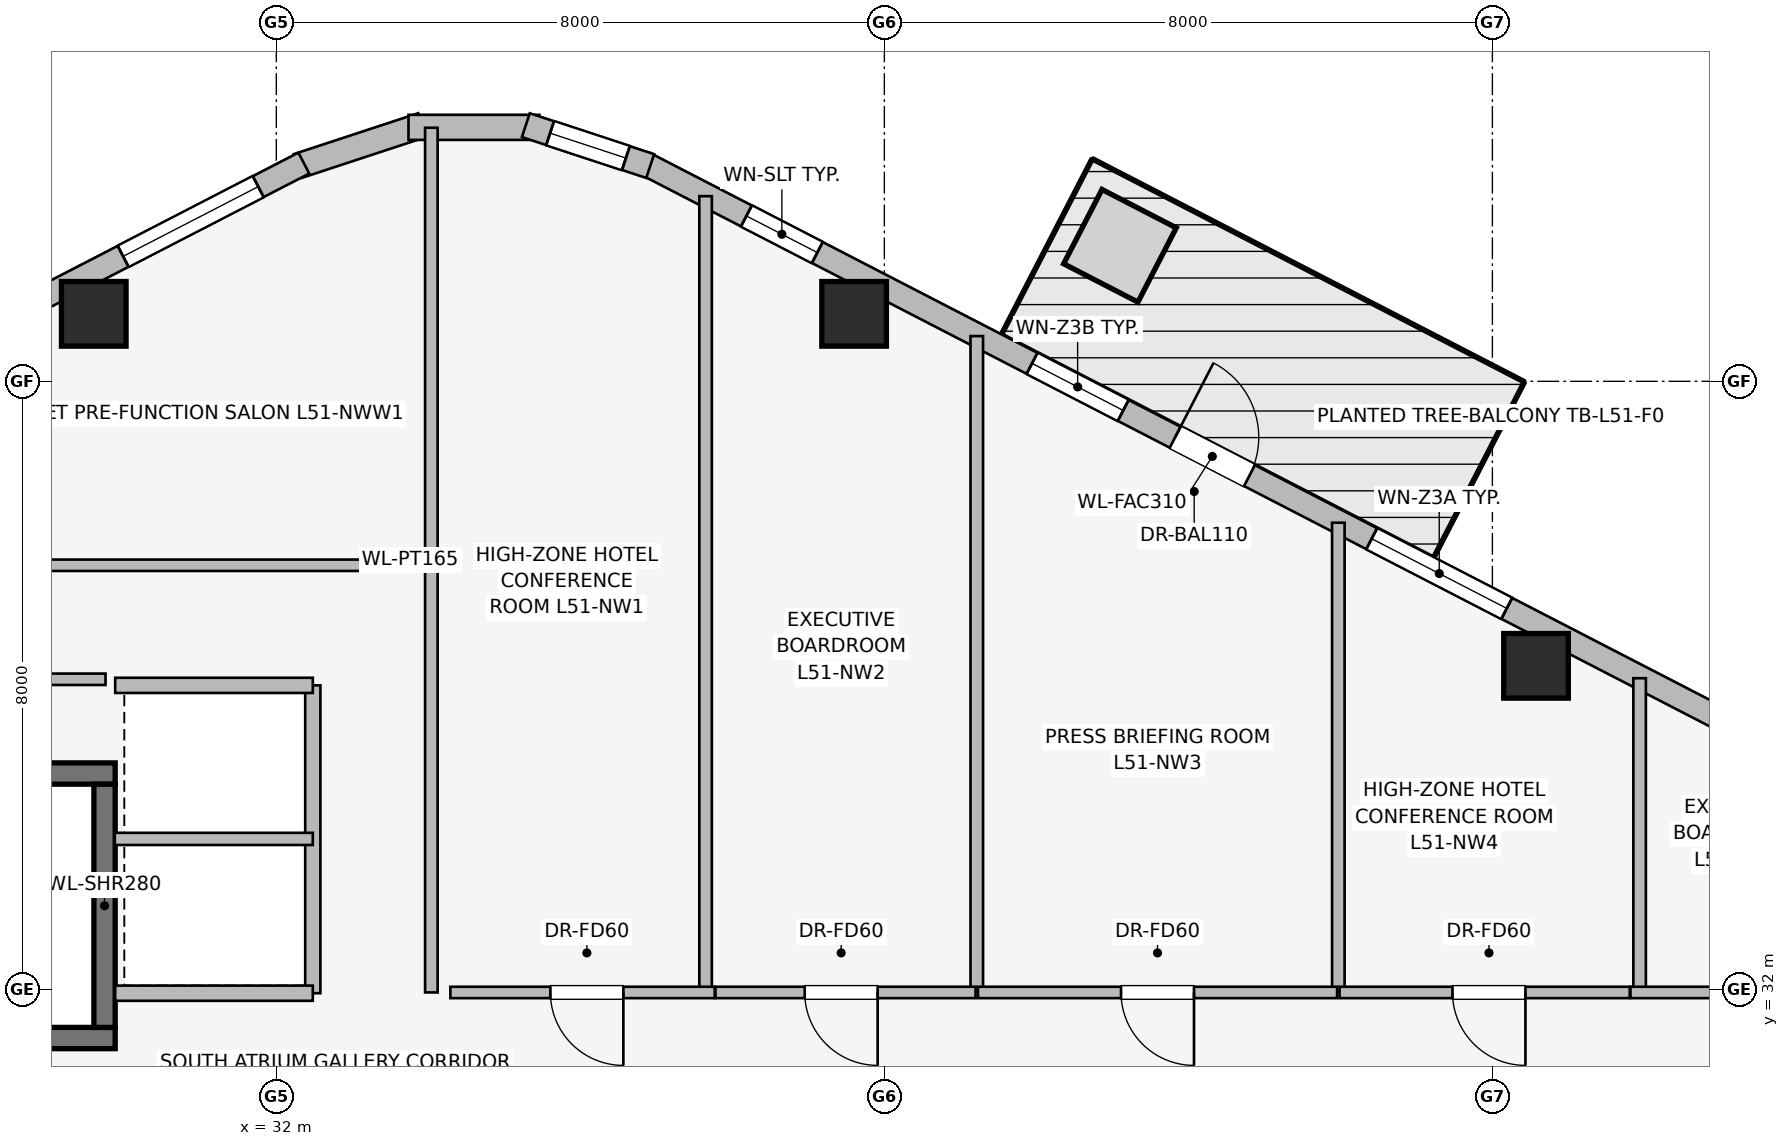
"""IFC4 building model, lengths in metres.
Left out: names, types, materials, properties, quantities, classifications, styles, units other than length and angle.
Written with IfcOpenShell. Run it as: python <this file> out.ifc"""

import sys

from ifc_helpers import new_model, si_unit, direction, frame, frame_2d, origin, origin_2d, place, context, subcontext, project, spatial, rectangle, extrude, element, fill, save


model = new_model("IFC4")
c1 = context("Model", 3, precision=1e-05, world=origin(), true_north=direction((0.0, 1.0)))
c2 = subcontext(c1, "Body", "Model", "MODEL_VIEW")
j1 = project(units=[si_unit("LENGTHUNIT", "METRE"), si_unit("PLANEANGLEUNIT", "RADIAN")], contexts=[c1])
p1 = place(None, origin())
s1 = spatial("IfcSite", under=j1, at=p1, CompositionType="ELEMENT")
p2 = place(p1, origin())
s2 = spatial("IfcBuilding", under=s1, at=p2, CompositionType="ELEMENT")
p3 = place(p2, frame((0.0, 0.0, 187.8)))
s3 = spatial("IfcBuildingStorey", under=s2, at=p3, CompositionType="ELEMENT", Elevation=187.8)
p4 = place(p3, frame((21.52, 31.36, 0.0), z_axis=(0.0, 0.0, 1.0), x_axis=(1.0, 0.0, 0.0)))
e1 = element("IfcWall", 1, at=p4, inside=s3, PredefinedType="SHEAR", context=c2, shape_type="SweptSolid", body=[
    extrude(rectangle(XDim=8.36, YDim=0.28, at=frame_2d((4.18, 0.0))), origin(), (0.0, 0.0, 1.0), 3.45),
])
p5 = place(p4, frame((0.45, 0.0, 0.0)))
e2 = element("IfcOpeningElement", 2, at=p5, cuts=e1, PredefinedType="OPENING", context=c2, shape_type="SweptSolid", body=[
    extrude(rectangle(XDim=1.05, YDim=2.0, at=frame_2d((0.525, 1.0))), frame((0.0, 0.15, 0.0), z_axis=(0.0, -1.0, 0.0), x_axis=(1.0, 0.0, 0.0)), (0.0, 0.0, 1.0), 0.3),
])
p6 = place(p3, frame((29.88, 34.84, 0.0), z_axis=(0.0, 0.0, 1.0), x_axis=(-1.0, 0.0, 0.0)))
e3 = element("IfcWall", 3, at=p6, inside=s3, PredefinedType="SHEAR", context=c2, shape_type="SweptSolid", body=[
    extrude(rectangle(XDim=8.36, YDim=0.28, at=frame_2d((4.18, 0.0))), origin(), (0.0, 0.0, 1.0), 3.45),
])
p7 = place(p3, frame((29.74, 31.5, 0.0), z_axis=(0.0, 0.0, 1.0), x_axis=(0.0, 1.0, 0.0)))
e4 = element("IfcWall", 4, at=p7, inside=s3, PredefinedType="SHEAR", context=c2, shape_type="SweptSolid", body=[
    extrude(rectangle(XDim=3.2, YDim=0.28, at=frame_2d((1.6, 0.0))), origin(), (0.0, 0.0, 1.0), 3.45),
])
for number, where, z_axis, x_axis in (
    (5, (48.574, 36.257, 0.0), (0.0, 0.0, 1.0), (1.0, 0.0, 0.0)),
    (6, (39.602, 40.888, 0.0), (0.0, 0.0, 1.0), (1.0, 0.0, 0.0)),
    (7, (29.598, 40.888, 0.0), (0.0, 0.0, 1.0), (1.0, 0.0, 0.0)),
):
    element("IfcColumn", number, at=place(p3, frame(where, z_axis=z_axis, x_axis=x_axis)), inside=s3, PredefinedType="COLUMN", context=c2, shape_type="SweptSolid", body=[
        extrude(rectangle(XDim=0.85, YDim=0.85, at=origin_2d()), origin(), (0.0, 0.0, 1.0), 3.45),
    ])
p8 = place(p3, frame((36.838, 42.871, 0.0), z_axis=(0.0, 0.0, 1.0), x_axis=(0.888626188278, -0.458632202867, 0.0)))
e8 = element("IfcWall", 8, at=p8, inside=s3, PredefinedType="STANDARD", context=c2, shape_type="SweptSolid", body=[
    extrude(rectangle(XDim=16.828, YDim=0.31, at=frame_2d((8.414, 0.0))), origin(), (0.0, 0.0, 1.0), 3.14),
])
p9 = place(p8, frame((7.864, 0.0, 0.0)))
e9 = element("IfcOpeningElement", 9, at=p9, cuts=e8, PredefinedType="OPENING", context=c2, shape_type="SweptSolid", body=[
    extrude(rectangle(XDim=1.1, YDim=2.04, at=frame_2d((0.55, 1.02))), frame((0.0, 0.165, 0.0), z_axis=(0.0, -1.0, 0.0), x_axis=(1.0, 0.0, 0.0)), (0.0, 0.0, 1.0), 0.33),
])
p10 = place(p8, frame((1.516, 0.0, 0.75)))
e10 = element("IfcOpeningElement", 10, at=p10, cuts=e8, PredefinedType="OPENING", context=c2, shape_type="SweptSolid", body=[
    extrude(rectangle(XDim=1.05, YDim=1.4, at=frame_2d((0.525, 0.7))), frame((0.0, 0.165, 0.0), z_axis=(0.0, -1.0, 0.0), x_axis=(1.0, 0.0, 0.0)), (0.0, 0.0, 1.0), 0.33),
])
p11 = place(p8, frame((5.745, 0.0, 0.75)))
e11 = element("IfcOpeningElement", 11, at=p11, cuts=e8, PredefinedType="OPENING", context=c2, shape_type="SweptSolid", body=[
    extrude(rectangle(XDim=1.35, YDim=1.45, at=frame_2d((0.675, 0.725))), frame((0.0, 0.165, 0.0), z_axis=(0.0, -1.0, 0.0), x_axis=(1.0, 0.0, 0.0)), (0.0, 0.0, 1.0), 0.33),
])
p12 = place(p8, frame((10.774, 0.0, 0.75)))
e12 = element("IfcOpeningElement", 12, at=p12, cuts=e8, PredefinedType="OPENING", context=c2, shape_type="SweptSolid", body=[
    extrude(rectangle(XDim=2.0, YDim=1.5, at=frame_2d((1.0, 0.75))), frame((0.0, 0.165, 0.0), z_axis=(0.0, -1.0, 0.0), x_axis=(1.0, 0.0, 0.0)), (0.0, 0.0, 1.0), 0.33),
])
p13 = place(p3, frame((32.281, 42.832, 0.0), z_axis=(0.0, 0.0, 1.0), x_axis=(0.949937416267, 0.312440242569, 0.0)))
e13 = element("IfcWall", 13, at=p13, inside=s3, PredefinedType="STANDARD", context=c2, shape_type="SweptSolid", body=[
    extrude(rectangle(XDim=1.722, YDim=0.33, at=frame_2d((0.861, 0.0))), origin(), (0.0, 0.0, 1.0), 3.14),
])
p14 = place(p3, frame((33.739, 43.341, 0.0), z_axis=(0.0, 0.0, 1.0), x_axis=(1.0, 0.0, 0.0)))
e14 = element("IfcWall", 14, at=p14, inside=s3, PredefinedType="STANDARD", context=c2, shape_type="SweptSolid", body=[
    extrude(rectangle(XDim=1.722, YDim=0.33, at=frame_2d((0.861, 0.0))), origin(), (0.0, 0.0, 1.0), 3.14),
])
p15 = place(p3, frame((35.283, 43.37, 0.0), z_axis=(0.0, 0.0, 1.0), x_axis=(0.949937416267, -0.312440242569, 0.0)))
e15 = element("IfcWall", 15, at=p15, inside=s3, PredefinedType="STANDARD", context=c2, shape_type="SweptSolid", body=[
    extrude(rectangle(XDim=1.722, YDim=0.33, at=frame_2d((0.861, 0.0))), origin(), (0.0, 0.0, 1.0), 3.14),
])
p16 = place(p15, frame((0.336, 0.0, 0.75)))
e16 = element("IfcOpeningElement", 16, at=p16, cuts=e15, PredefinedType="OPENING", context=c2, shape_type="SweptSolid", body=[
    extrude(rectangle(XDim=1.05, YDim=1.4, at=frame_2d((0.525, 0.7))), frame((0.0, 0.175, 0.0), z_axis=(0.0, -1.0, 0.0), x_axis=(1.0, 0.0, 0.0)), (0.0, 0.0, 1.0), 0.35),
])
p17 = place(p3, frame((17.408, 35.153, 0.0), z_axis=(0.0, 0.0, 1.0), x_axis=(0.888626188278, 0.458632202867, 0.0)))
e17 = element("IfcWall", 17, at=p17, inside=s3, PredefinedType="STANDARD", context=c2, shape_type="SweptSolid", body=[
    extrude(rectangle(XDim=16.828, YDim=0.31, at=frame_2d((8.414, 0.0))), origin(), (0.0, 0.0, 1.0), 3.14),
])
p18 = place(p17, frame((0.675, 0.0, 0.75)))
e18 = element("IfcOpeningElement", 18, at=p18, cuts=e17, PredefinedType="OPENING", context=c2, shape_type="SweptSolid", body=[
    extrude(rectangle(XDim=2.0, YDim=1.5, at=frame_2d((1.0, 0.75))), frame((0.0, 0.165, 0.0), z_axis=(0.0, -1.0, 0.0), x_axis=(1.0, 0.0, 0.0)), (0.0, 0.0, 1.0), 0.33),
])
p19 = place(p17, frame((6.312, 0.0, 0.75)))
e19 = element("IfcOpeningElement", 19, at=p19, cuts=e17, PredefinedType="OPENING", context=c2, shape_type="SweptSolid", body=[
    extrude(rectangle(XDim=1.35, YDim=1.45, at=frame_2d((0.675, 0.725))), frame((0.0, 0.165, 0.0), z_axis=(0.0, -1.0, 0.0), x_axis=(1.0, 0.0, 0.0)), (0.0, 0.0, 1.0), 0.33),
])
p20 = place(p17, frame((8.676, 0.0, 0.75)))
e20 = element("IfcOpeningElement", 20, at=p20, cuts=e17, PredefinedType="OPENING", context=c2, shape_type="SweptSolid", body=[
    extrude(rectangle(XDim=1.35, YDim=1.45, at=frame_2d((0.675, 0.725))), frame((0.0, 0.165, 0.0), z_axis=(0.0, -1.0, 0.0), x_axis=(1.0, 0.0, 0.0)), (0.0, 0.0, 1.0), 0.33),
])
p21 = place(p17, frame((11.041, 0.0, 0.75)))
e21 = element("IfcOpeningElement", 21, at=p21, cuts=e17, PredefinedType="OPENING", context=c2, shape_type="SweptSolid", body=[
    extrude(rectangle(XDim=1.35, YDim=1.45, at=frame_2d((0.675, 0.725))), frame((0.0, 0.165, 0.0), z_axis=(0.0, -1.0, 0.0), x_axis=(1.0, 0.0, 0.0)), (0.0, 0.0, 1.0), 0.33),
])
p22 = place(p17, frame((14.153, 0.0, 0.75)))
e22 = element("IfcOpeningElement", 22, at=p22, cuts=e17, PredefinedType="OPENING", context=c2, shape_type="SweptSolid", body=[
    extrude(rectangle(XDim=2.0, YDim=1.5, at=frame_2d((1.0, 0.75))), frame((0.0, 0.165, 0.0), z_axis=(0.0, -1.0, 0.0), x_axis=(1.0, 0.0, 0.0)), (0.0, 0.0, 1.0), 0.33),
])
p23 = place(p3, frame((32.48, 31.95, 0.0), z_axis=(0.0, 0.0, 1.0), x_axis=(0.0, 1.0, 0.0)))
e23 = element("IfcWall", 23, at=p23, inside=s3, PredefinedType="PARTITIONING", context=c2, shape_type="SweptSolid", body=[
    extrude(rectangle(XDim=4.05, YDim=0.2, at=frame_2d((2.025, 0.0))), origin(), (0.0, 0.0, 1.0), 3.14),
])
for number, where, z_axis, x_axis in (
    (24, (29.88, 36.0, 0.0), (0.0, 0.0, 1.0), (1.0, 0.0, 0.0)),
    (25, (32.48, 31.95, 0.0), (0.0, 0.0, 1.0), (-1.0, 0.0, 0.0)),
):
    element("IfcWall", number, at=place(p3, frame(where, z_axis=z_axis, x_axis=x_axis)), inside=s3, PredefinedType="PARTITIONING", context=c2, shape_type="SweptSolid", body=[
        extrude(rectangle(XDim=2.6, YDim=0.2, at=frame_2d((1.3, 0.0))), origin(), (0.0, 0.0, 1.0), 3.14),
    ])
p24 = place(p3, frame((29.875, 33.98, 0.0), z_axis=(0.0, 0.0, 1.0), x_axis=(1.0, 0.0, 0.0)))
e26 = element("IfcWall", 26, at=p24, inside=s3, PredefinedType="PARTITIONING", context=c2, shape_type="SweptSolid", body=[
    extrude(rectangle(XDim=2.605, YDim=0.16, at=frame_2d((1.302, 0.0))), origin(), (0.0, 0.0, 1.0), 2.532),
])
p25 = place(p3, frame((34.0, 37.58, 0.0), z_axis=(0.0, 0.0, 1.0), x_axis=(-1.0, 0.0, 0.0)))
e27 = element("IfcWall", 27, at=p25, inside=s3, PredefinedType="PARTITIONING", context=c2, shape_type="SweptSolid", body=[
    extrude(rectangle(XDim=12.075, YDim=0.15, at=frame_2d((6.038, 0.0))), origin(), (0.0, 0.0, 1.0), 2.532),
])
p26 = place(p25, frame((5.195, 0.0, 0.0)))
e28 = element("IfcOpeningElement", 28, at=p26, cuts=e27, PredefinedType="OPENING", context=c2, shape_type="SweptSolid", body=[
    extrude(rectangle(XDim=0.96, YDim=2.0, at=frame_2d((0.48, 1.0))), frame((0.0, 0.085, 0.0), z_axis=(0.0, -1.0, 0.0), x_axis=(1.0, 0.0, 0.0)), (0.0, 0.0, 1.0), 0.17),
])
p27 = place(p3, frame((34.04, 31.96, 0.0), z_axis=(0.0, 0.0, 1.0), x_axis=(0.0, 1.0, 0.0)))
e29 = element("IfcWall", 29, at=p27, inside=s3, PredefinedType="PARTITIONING", context=c2, shape_type="SweptSolid", body=[
    extrude(rectangle(XDim=11.376, YDim=0.165, at=frame_2d((5.688, 0.0))), origin(), (0.0, 0.0, 1.0), 3.14),
])
p28 = place(p3, frame((37.648, 31.97, 0.0), z_axis=(0.0, 0.0, 1.0), x_axis=(0.0, 1.0, 0.0)))
e30 = element("IfcWall", 30, at=p28, inside=s3, PredefinedType="PARTITIONING", context=c2, shape_type="SweptSolid", body=[
    extrude(rectangle(XDim=10.466, YDim=0.165, at=frame_2d((5.233, 0.0))), origin(), (0.0, 0.0, 1.0), 3.14),
])
p29 = place(p3, frame((41.216, 31.97, 0.0), z_axis=(0.0, 0.0, 1.0), x_axis=(0.0, 1.0, 0.0)))
e31 = element("IfcWall", 31, at=p29, inside=s3, PredefinedType="PARTITIONING", context=c2, shape_type="SweptSolid", body=[
    extrude(rectangle(XDim=8.625, YDim=0.165, at=frame_2d((4.312, 0.0))), origin(), (0.0, 0.0, 1.0), 3.14),
])
p30 = place(p3, frame((45.973, 31.97, 0.0), z_axis=(0.0, 0.0, 1.0), x_axis=(0.0, 1.0, 0.0)))
e32 = element("IfcWall", 32, at=p30, inside=s3, PredefinedType="PARTITIONING", context=c2, shape_type="SweptSolid", body=[
    extrude(rectangle(XDim=6.17, YDim=0.165, at=frame_2d((3.085, 0.0))), origin(), (0.0, 0.0, 1.0), 3.14),
])
p31 = place(p3, frame((49.937, 31.97, 0.0), z_axis=(0.0, 0.0, 1.0), x_axis=(0.0, 1.0, 0.0)))
e33 = element("IfcWall", 33, at=p31, inside=s3, PredefinedType="PARTITIONING", context=c2, shape_type="SweptSolid", body=[
    extrude(rectangle(XDim=4.124, YDim=0.165, at=frame_2d((2.062, 0.0))), origin(), (0.0, 0.0, 1.0), 3.14),
])
p32 = place(p3, frame((37.768, 31.96, 0.0), z_axis=(0.0, 0.0, 1.0), x_axis=(-1.0, 0.0, 0.0)))
e34 = element("IfcWall", 34, at=p32, inside=s3, PredefinedType="PARTITIONING", context=c2, shape_type="SweptSolid", body=[
    extrude(rectangle(XDim=3.478, YDim=0.15, at=frame_2d((1.739, 0.0))), origin(), (0.0, 0.0, 1.0), 3.14),
])
p33 = place(p32, frame((1.202, 0.0, 0.0)))
e35 = element("IfcOpeningElement", 35, at=p33, cuts=e34, PredefinedType="OPENING", context=c2, shape_type="SweptSolid", body=[
    extrude(rectangle(XDim=0.96, YDim=2.0, at=frame_2d((0.48, 1.0))), frame((0.0, 0.085, 0.0), z_axis=(0.0, -1.0, 0.0), x_axis=(1.0, 0.0, 0.0)), (0.0, 0.0, 1.0), 0.17),
])
p34 = place(p3, frame((41.2, 31.96, 0.0), z_axis=(0.0, 0.0, 1.0), x_axis=(-1.0, 0.0, 0.0)))
e36 = element("IfcWall", 36, at=p34, inside=s3, PredefinedType="PARTITIONING", context=c2, shape_type="SweptSolid", body=[
    extrude(rectangle(XDim=3.422, YDim=0.15, at=frame_2d((1.711, 0.0))), origin(), (0.0, 0.0, 1.0), 3.14),
])
p35 = place(p34, frame((1.288, 0.0, 0.0)))
e37 = element("IfcOpeningElement", 37, at=p35, cuts=e36, PredefinedType="OPENING", context=c2, shape_type="SweptSolid", body=[
    extrude(rectangle(XDim=0.96, YDim=2.0, at=frame_2d((0.48, 1.0))), frame((0.0, 0.085, 0.0), z_axis=(0.0, -1.0, 0.0), x_axis=(1.0, 0.0, 0.0)), (0.0, 0.0, 1.0), 0.17),
])
p36 = place(p3, frame((45.957, 31.96, 0.0), z_axis=(0.0, 0.0, 1.0), x_axis=(-1.0, 0.0, 0.0)))
e38 = element("IfcWall", 38, at=p36, inside=s3, PredefinedType="PARTITIONING", context=c2, shape_type="SweptSolid", body=[
    extrude(rectangle(XDim=4.725, YDim=0.15, at=frame_2d((2.363, 0.0))), origin(), (0.0, 0.0, 1.0), 3.14),
])
p37 = place(p36, frame((1.883, 0.0, 0.0)))
e39 = element("IfcOpeningElement", 39, at=p37, cuts=e38, PredefinedType="OPENING", context=c2, shape_type="SweptSolid", body=[
    extrude(rectangle(XDim=0.96, YDim=2.0, at=frame_2d((0.48, 1.0))), frame((0.0, 0.085, 0.0), z_axis=(0.0, -1.0, 0.0), x_axis=(1.0, 0.0, 0.0)), (0.0, 0.0, 1.0), 0.17),
])
p38 = place(p3, frame((49.807, 31.96, 0.0), z_axis=(0.0, 0.0, 1.0), x_axis=(-1.0, 0.0, 0.0)))
e40 = element("IfcWall", 40, at=p38, inside=s3, PredefinedType="PARTITIONING", context=c2, shape_type="SweptSolid", body=[
    extrude(rectangle(XDim=3.818, YDim=0.15, at=frame_2d((1.909, 0.0))), origin(), (0.0, 0.0, 1.0), 3.14),
])
p39 = place(p38, frame((1.372, 0.0, 0.0)))
e41 = element("IfcOpeningElement", 41, at=p39, cuts=e40, PredefinedType="OPENING", context=c2, shape_type="SweptSolid", body=[
    extrude(rectangle(XDim=0.96, YDim=2.0, at=frame_2d((0.48, 1.0))), frame((0.0, 0.085, 0.0), z_axis=(0.0, -1.0, 0.0), x_axis=(1.0, 0.0, 0.0)), (0.0, 0.0, 1.0), 0.17),
])
p40 = place(p3, frame((53.97, 31.96, 0.0), z_axis=(0.0, 0.0, 1.0), x_axis=(-1.0, 0.0, 0.0)))
e42 = element("IfcWall", 42, at=p40, inside=s3, PredefinedType="PARTITIONING", context=c2, shape_type="SweptSolid", body=[
    extrude(rectangle(XDim=4.153, YDim=0.15, at=frame_2d((2.077, 0.0))), origin(), (0.0, 0.0, 1.0), 3.14),
])
p41 = place(p40, frame((1.653, 0.0, 0.0)))
e43 = element("IfcOpeningElement", 43, at=p41, cuts=e42, PredefinedType="OPENING", context=c2, shape_type="SweptSolid", body=[
    extrude(rectangle(XDim=0.96, YDim=2.0, at=frame_2d((0.48, 1.0))), frame((0.0, 0.085, 0.0), z_axis=(0.0, -1.0, 0.0), x_axis=(1.0, 0.0, 0.0)), (0.0, 0.0, 1.0), 0.17),
])
p42 = place(p3, frame((29.753, 36.08, 0.0), z_axis=(0.0, 0.0, 1.0), x_axis=(-1.0, 0.0, 0.0)))
e44 = element("IfcWall", 44, at=p42, inside=s3, PredefinedType="PARTITIONING", context=c2, shape_type="SweptSolid", body=[
    extrude(rectangle(XDim=7.353, YDim=0.15, at=frame_2d((3.677, 0.0))), origin(), (0.0, 0.0, 1.0), 3.14),
])
p43 = place(p9, origin())
e45 = element("IfcDoor", 45, at=p43, inside=s3, OperationType="SINGLE_SWING_LEFT", PredefinedType="DOOR", context=c2, shape_type="SweptSolid", body=[
    extrude(rectangle(XDim=1.1, YDim=2.04, at=frame_2d((0.55, 1.02))), frame((0.0, 0.025, 0.0), z_axis=(0.0, -1.0, 0.0), x_axis=(1.0, 0.0, 0.0)), (0.0, 0.0, 1.0), 0.05),
])
fill(e9, e45)
p44 = place(p10, origin())
e46 = element("IfcWindow", 46, at=p44, inside=s3, PartitioningType="SINGLE_PANEL", PredefinedType="WINDOW", context=c2, shape_type="SweptSolid", body=[
    extrude(rectangle(XDim=1.05, YDim=1.4, at=frame_2d((0.525, 0.7))), frame((0.0, 0.03, 0.0), z_axis=(0.0, -1.0, 0.0), x_axis=(1.0, 0.0, 0.0)), (0.0, 0.0, 1.0), 0.06),
])
fill(e10, e46)
p45 = place(p11, origin())
e47 = element("IfcWindow", 47, at=p45, inside=s3, PartitioningType="SINGLE_PANEL", PredefinedType="WINDOW", context=c2, shape_type="SweptSolid", body=[
    extrude(rectangle(XDim=1.35, YDim=1.45, at=frame_2d((0.675, 0.725))), frame((0.0, 0.03, 0.0), z_axis=(0.0, -1.0, 0.0), x_axis=(1.0, 0.0, 0.0)), (0.0, 0.0, 1.0), 0.06),
])
fill(e11, e47)
p46 = place(p12, origin())
e48 = element("IfcWindow", 48, at=p46, inside=s3, PartitioningType="SINGLE_PANEL", PredefinedType="WINDOW", context=c2, shape_type="SweptSolid", body=[
    extrude(rectangle(XDim=2.0, YDim=1.5, at=frame_2d((1.0, 0.75))), frame((0.0, 0.03, 0.0), z_axis=(0.0, -1.0, 0.0), x_axis=(1.0, 0.0, 0.0)), (0.0, 0.0, 1.0), 0.06),
])
fill(e12, e48)
p47 = place(p16, origin())
e49 = element("IfcWindow", 49, at=p47, inside=s3, PartitioningType="SINGLE_PANEL", PredefinedType="WINDOW", context=c2, shape_type="SweptSolid", body=[
    extrude(rectangle(XDim=1.05, YDim=1.4, at=frame_2d((0.525, 0.7))), frame((0.0, 0.03, 0.0), z_axis=(0.0, -1.0, 0.0), x_axis=(1.0, 0.0, 0.0)), (0.0, 0.0, 1.0), 0.06),
])
fill(e16, e49)
p48 = place(p22, origin())
e50 = element("IfcWindow", 50, at=p48, inside=s3, PartitioningType="SINGLE_PANEL", PredefinedType="WINDOW", context=c2, shape_type="SweptSolid", body=[
    extrude(rectangle(XDim=2.0, YDim=1.5, at=frame_2d((1.0, 0.75))), frame((0.0, 0.03, 0.0), z_axis=(0.0, -1.0, 0.0), x_axis=(1.0, 0.0, 0.0)), (0.0, 0.0, 1.0), 0.06),
])
fill(e22, e50)
p49 = place(p33, origin())
e51 = element("IfcDoor", 51, at=p49, inside=s3, OperationType="SINGLE_SWING_LEFT", PredefinedType="DOOR", context=c2, shape_type="SweptSolid", body=[
    extrude(rectangle(XDim=0.96, YDim=2.0, at=frame_2d((0.48, 1.0))), frame((0.0, 0.025, 0.0), z_axis=(0.0, -1.0, 0.0), x_axis=(1.0, 0.0, 0.0)), (0.0, 0.0, 1.0), 0.05),
])
fill(e35, e51)
p50 = place(p35, origin())
e52 = element("IfcDoor", 52, at=p50, inside=s3, OperationType="SINGLE_SWING_LEFT", PredefinedType="DOOR", context=c2, shape_type="SweptSolid", body=[
    extrude(rectangle(XDim=0.96, YDim=2.0, at=frame_2d((0.48, 1.0))), frame((0.0, 0.025, 0.0), z_axis=(0.0, -1.0, 0.0), x_axis=(1.0, 0.0, 0.0)), (0.0, 0.0, 1.0), 0.05),
])
fill(e37, e52)
p51 = place(p37, origin())
e53 = element("IfcDoor", 53, at=p51, inside=s3, OperationType="SINGLE_SWING_LEFT", PredefinedType="DOOR", context=c2, shape_type="SweptSolid", body=[
    extrude(rectangle(XDim=0.96, YDim=2.0, at=frame_2d((0.48, 1.0))), frame((0.0, 0.025, 0.0), z_axis=(0.0, -1.0, 0.0), x_axis=(1.0, 0.0, 0.0)), (0.0, 0.0, 1.0), 0.05),
])
fill(e39, e53)
p52 = place(p39, origin())
e54 = element("IfcDoor", 54, at=p52, inside=s3, OperationType="SINGLE_SWING_LEFT", PredefinedType="DOOR", context=c2, shape_type="SweptSolid", body=[
    extrude(rectangle(XDim=0.96, YDim=2.0, at=frame_2d((0.48, 1.0))), frame((0.0, 0.025, 0.0), z_axis=(0.0, -1.0, 0.0), x_axis=(1.0, 0.0, 0.0)), (0.0, 0.0, 1.0), 0.05),
])
fill(e41, e54)
save(model, sys.argv[1])
